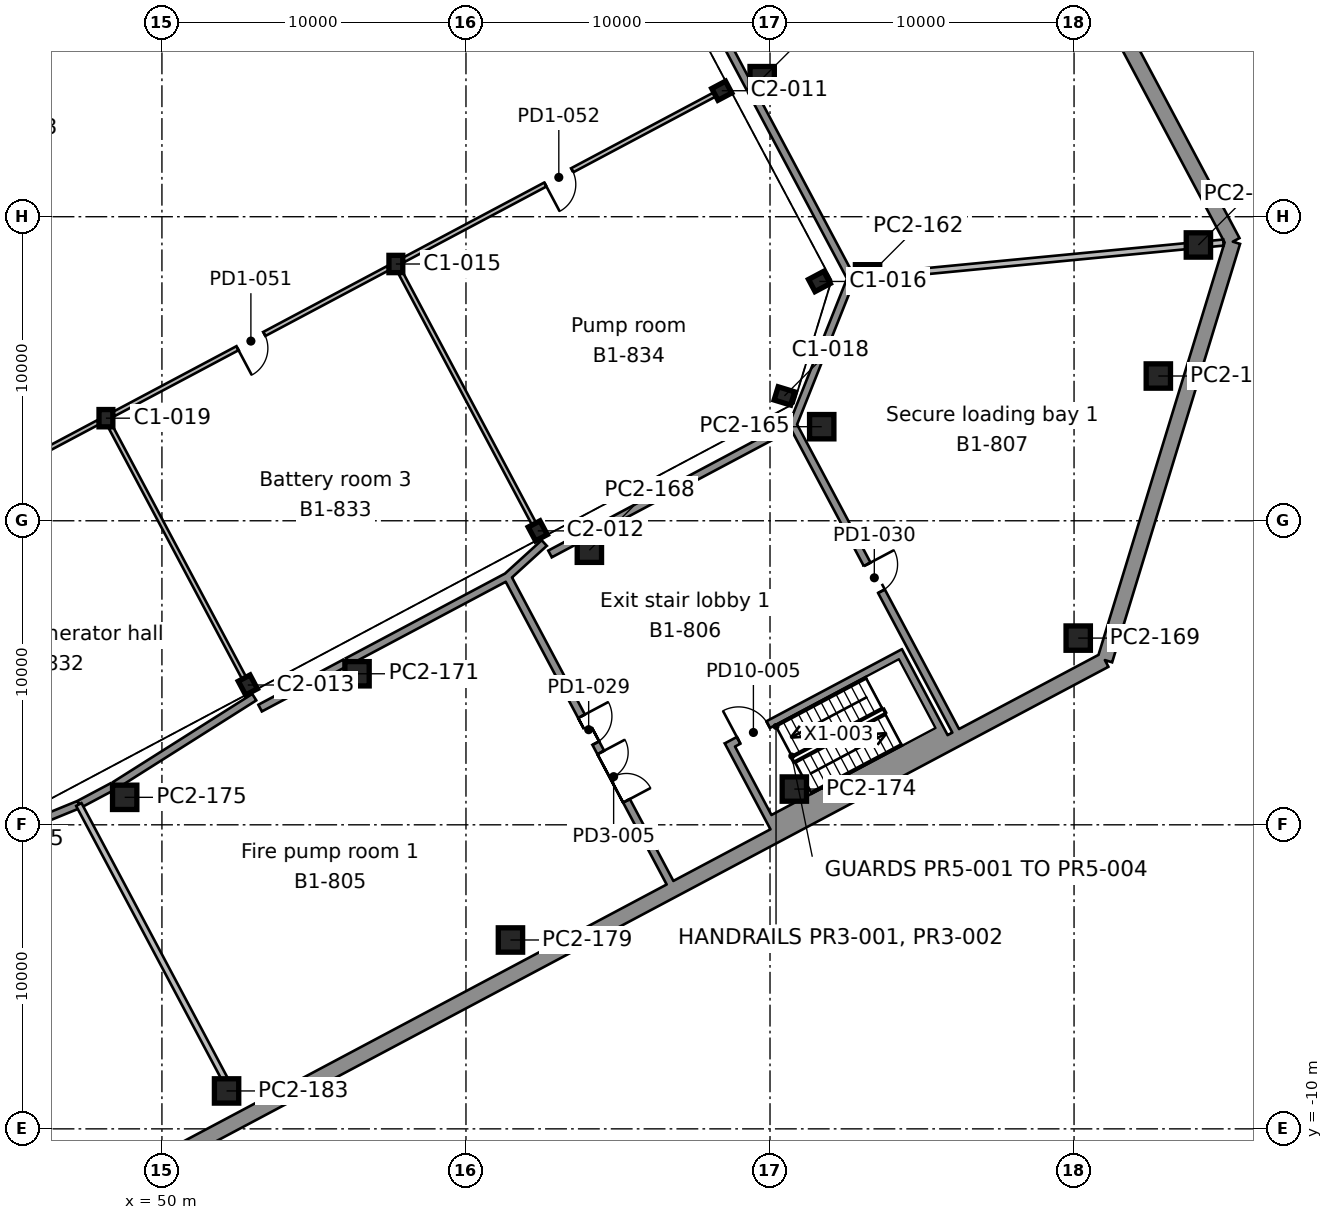
"""IFC4 building model, lengths in metres.
Left out: names, types, materials, properties, quantities, classifications, styles, units other than length and angle.
Written with IfcOpenShell. Run it as: python <this file> out.ifc"""

import sys

from ifc_helpers import new_model, si_unit, direction, frame, frame_2d, origin, origin_2d, place, context, subcontext, project, spatial, rectangle, i_section, extrude, element, fill, save


model = new_model("IFC4")
c1 = context("Model", 3, precision=1e-05, world=origin(), true_north=direction((0.0, 1.0)))
c2 = subcontext(c1, "Body", "Model", "MODEL_VIEW")
j1 = project(units=[si_unit("LENGTHUNIT", "METRE"), si_unit("PLANEANGLEUNIT", "RADIAN")], contexts=[c1])
p1 = place(None, origin())
s1 = spatial("IfcSite", under=j1, at=p1, CompositionType="ELEMENT")
p2 = place(p1, origin())
s2 = spatial("IfcBuilding", under=s1, at=p2, CompositionType="ELEMENT")
p3 = place(p2, frame((0.0, 0.0, -4.5)))
s3 = spatial("IfcBuildingStorey", under=s2, at=p3, CompositionType="ELEMENT", Elevation=-4.5)
for number, where, z_axis, x_axis in (
    (1, (52.825, 4.598, 0.0), (0.0, 0.0, 1.0), (0.883, 0.469, 0.0)),
    (2, (62.361, 9.668, 0.0), (0.0, 0.0, 1.0), (0.883, 0.469, 0.0)),
):
    element("IfcColumn", number, at=place(p3, frame(where, z_axis=z_axis, x_axis=x_axis)), inside=s3, PredefinedType="COLUMN", context=c2, shape_type="SweptSolid", body=[
        extrude(i_section(OverallWidth=0.437, OverallDepth=0.513, WebThickness=0.061, FlangeThickness=0.097, FilletRadius=0.015, at=origin_2d()), origin(), (0.0, 0.0, 1.0), 4.5),
    ])
for number, where, z_axis, x_axis in (
    (3, (48.158, 13.374, 0.0), (0.0, 0.0, 1.0), (1.0, 0.0, 0.0)),
    (4, (70.474, 14.106, 0.0), (0.0, 0.0, 1.0), (0.292, 0.956, 0.0)),
    (5, (71.625, 17.871, 0.0), (0.0, 0.0, 1.0), (-0.469, 0.883, 0.0)),
    (6, (57.694, 18.445, 0.0), (0.0, 0.0, 1.0), (1.0, 0.0, 0.0)),
):
    element("IfcColumn", number, at=place(p3, frame(where, z_axis=z_axis, x_axis=x_axis)), inside=s3, PredefinedType="COLUMN", context=c2, shape_type="SweptSolid", body=[
        extrude(i_section(OverallWidth=0.455, OverallDepth=0.569, WebThickness=0.078, FlangeThickness=0.125, FilletRadius=0.015, at=origin_2d()), origin(), (0.0, 0.0, 1.0), 4.5),
    ])
p4 = place(p3, frame((68.413, 24.144, 0.0), z_axis=(0.0, 0.0, 1.0), x_axis=(-0.469471562786, 0.882947592859, 0.0)))
e7 = element("IfcColumn", 7, at=p4, inside=s3, PredefinedType="COLUMN", context=c2, shape_type="SweptSolid", body=[
    extrude(i_section(OverallWidth=0.437, OverallDepth=0.513, WebThickness=0.061, FlangeThickness=0.097, FilletRadius=0.015, at=origin_2d()), origin(), (0.0, 0.0, 1.0), 4.5),
])
p5 = place(p3, frame((5.703, -34.625, 0.0), z_axis=(0.0, 0.0, 1.0), x_axis=(0.882947521781, 0.469471696464, 0.0)))
e8 = element("IfcWall", 8, at=p5, inside=s3, PredefinedType="SOLIDWALL", context=c2, shape_type="SweptSolid", body=[
    extrude(rectangle(XDim=85.294, YDim=0.5, at=frame_2d((42.647, 0.0))), origin(), (0.0, 0.0, 1.0), 4.5),
])
p6 = place(p3, frame((81.013, 5.418, 0.0), z_axis=(0.0, 0.0, 1.0), x_axis=(0.292375850554, 0.956303488445, 0.0)))
e9 = element("IfcWall", 9, at=p6, inside=s3, PredefinedType="SOLIDWALL", context=c2, shape_type="SweptSolid", body=[
    extrude(rectangle(XDim=14.391, YDim=0.5, at=frame_2d((7.195, 0.0))), origin(), (0.0, 0.0, 1.0), 4.5),
])
p7 = place(p3, frame((85.221, 19.18, 0.0), z_axis=(0.0, 0.0, 1.0), x_axis=(-0.469470569953, 0.882948120757, 0.0)))
e10 = element("IfcWall", 10, at=p7, inside=s3, PredefinedType="SOLIDWALL", context=c2, shape_type="SweptSolid", body=[
    extrude(rectangle(XDim=46.148, YDim=0.5, at=frame_2d((23.074, 0.0))), origin(), (0.0, 0.0, 1.0), 4.5),
])
for number, where, z_axis, x_axis in (
    (11, (52.126, -8.753, 0.0), (0.0, 0.0, 1.0), (1.0, 0.0, 0.0)),
    (12, (61.463, -3.788, 0.0), (0.0, 0.0, 1.0), (1.0, 0.0, 0.0)),
    (13, (48.775, 0.904, 0.0), (0.0, 0.0, 1.0), (1.0, 0.0, 0.0)),
    (14, (70.8, 1.176, 0.0), (0.0, 0.0, 1.0), (1.0, 0.0, 0.0)),
    (15, (56.417, 4.968, 0.0), (0.0, 0.0, 1.0), (1.0, 0.0, 0.0)),
    (16, (80.137, 6.141, 0.0), (0.0, 0.0, 1.0), (1.0, 0.0, 0.0)),
    (17, (64.059, 9.031, 0.0), (0.0, 0.0, 1.0), (1.0, 0.0, 0.0)),
    (18, (71.701, 13.094, 0.0), (0.0, 0.0, 1.0), (1.0, 0.0, 0.0)),
    (19, (82.772, 14.761, 0.0), (0.0, 0.0, 1.0), (1.0, 0.0, 0.0)),
    (20, (73.208, 18.023, 0.0), (0.0, 0.0, 1.0), (1.0, 0.0, 0.0)),
    (21, (84.09, 19.071, 0.0), (0.0, 0.0, 1.0), (1.0, 0.0, 0.0)),
    (22, (69.742, 24.541, 0.0), (0.0, 0.0, 1.0), (1.0, 0.0, 0.0)),
):
    element("IfcColumn", number, at=place(p3, frame(where, z_axis=z_axis, x_axis=x_axis)), inside=s3, PredefinedType="COLUMN", context=c2, shape_type="SweptSolid", body=[
        extrude(rectangle(XDim=0.8, YDim=0.8, at=origin_2d()), origin(), (0.0, 0.0, 1.0), 4.05),
    ])
p8 = place(p3, frame((52.063, -8.353, 0.0), z_axis=(0.0, 0.0, 1.0), x_axis=(-0.469467926311, 0.882949526397, 0.0)))
e23 = element("IfcWall", 23, at=p8, inside=s3, PredefinedType="PARTITIONING", context=c2, shape_type="SweptSolid", body=[
    extrude(rectangle(XDim=10.217, YDim=0.2, at=frame_2d((5.109, 0.0))), origin(), (0.0, 0.0, 1.0), 4.05),
])
p9 = place(p3, frame((47.27, 0.67, 0.0), z_axis=(0.0, 0.0, 1.0), x_axis=(-0.925490593681, -0.378770591531, 0.0)))
e24 = element("IfcWall", 24, at=p9, inside=s3, PredefinedType="SOLIDWALL", context=c2, shape_type="SweptSolid", body=[
    extrude(rectangle(XDim=4.072, YDim=0.25, at=frame_2d((2.036, 0.0))), origin(), (0.0, 0.0, 1.0), 4.05),
])
p10 = place(p3, frame((66.711, -1.904, 0.0), z_axis=(0.0, 0.0, 1.0), x_axis=(-0.469474097874, 0.882946244924, 0.0)))
e25 = element("IfcWall", 25, at=p10, inside=s3, PredefinedType="SOLIDWALL", context=c2, shape_type="SweptSolid", body=[
    extrude(rectangle(XDim=11.4, YDim=0.25, at=frame_2d((5.7, 0.0))), origin(), (0.0, 0.0, 1.0), 4.05),
])
p11 = place(p10, frame((5.2, 0.0, 0.0)))
e26 = element("IfcOpeningElement", 26, at=p11, cuts=e25, PredefinedType="OPENING", context=c2, shape_type="SweptSolid", body=[
    extrude(rectangle(XDim=1.0, YDim=2.1, at=frame_2d((0.5, 1.05))), frame((0.0, 0.135, 0.0), z_axis=(0.0, -1.0, 0.0), x_axis=(1.0, 0.0, 0.0)), (0.0, 0.0, 1.0), 0.27),
])
p12 = place(p10, frame((3.05, 0.0, 0.0)))
e27 = element("IfcOpeningElement", 27, at=p12, cuts=e25, PredefinedType="OPENING", context=c2, shape_type="SweptSolid", body=[
    extrude(rectangle(XDim=1.8, YDim=2.1, at=frame_2d((0.9, 1.05))), frame((0.0, 0.135, 0.0), z_axis=(0.0, -1.0, 0.0), x_axis=(1.0, 0.0, 0.0)), (0.0, 0.0, 1.0), 0.27),
])
p13 = place(p3, frame((53.037, 4.198, 0.0), z_axis=(0.0, 0.0, 1.0), x_axis=(-0.845143693755, -0.534539181825, 0.0)))
e28 = element("IfcWall", 28, at=p13, inside=s3, PredefinedType="SOLIDWALL", context=c2, shape_type="SweptSolid", body=[
    extrude(rectangle(XDim=5.414, YDim=0.25, at=frame_2d((2.707, 0.0))), origin(), (0.0, 0.0, 1.0), 4.05),
])
p14 = place(p3, frame((48.375, 1.258, 0.0), z_axis=(0.0, 0.0, 1.0), x_axis=(-0.883006084416, -0.469361539631, 0.0)))
e29 = element("IfcWall", 29, at=p14, inside=s3, PredefinedType="SOLIDWALL", context=c2, shape_type="SweptSolid", body=[
    extrude(rectangle(XDim=1.24, YDim=0.25, at=frame_2d((0.62, 0.0))), origin(), (0.0, 0.0, 1.0), 4.05),
])
p15 = place(p3, frame((61.363, 8.164, 0.0), z_axis=(0.0, 0.0, 1.0), x_axis=(-0.882945796858, -0.469474940556, 0.0)))
e30 = element("IfcWall", 30, at=p15, inside=s3, PredefinedType="SOLIDWALL", context=c2, shape_type="SweptSolid", body=[
    extrude(rectangle(XDim=5.955, YDim=0.25, at=frame_2d((2.978, 0.0))), origin(), (0.0, 0.0, 1.0), 4.05),
])
p16 = place(p3, frame((56.017, 5.321, 0.0), z_axis=(0.0, 0.0, 1.0), x_axis=(-0.882921481106, -0.469520668555, 0.0)))
e31 = element("IfcWall", 31, at=p16, inside=s3, PredefinedType="SOLIDWALL", context=c2, shape_type="SweptSolid", body=[
    extrude(rectangle(XDim=3.158, YDim=0.25, at=frame_2d((1.579, 0.0))), origin(), (0.0, 0.0, 1.0), 4.05),
])
p17 = place(p3, frame((76.107, 3.092, 0.0), z_axis=(0.0, 0.0, 1.0), x_axis=(-0.469474097874, 0.882946244924, 0.0)))
e32 = element("IfcWall", 32, at=p17, inside=s3, PredefinedType="SOLIDWALL", context=c2, shape_type="SweptSolid", body=[
    extrude(rectangle(XDim=11.4, YDim=0.25, at=frame_2d((5.7, 0.0))), origin(), (0.0, 0.0, 1.0), 4.05),
])
p18 = place(p17, frame((5.2, 0.0, 0.0)))
e33 = element("IfcOpeningElement", 33, at=p18, cuts=e32, PredefinedType="OPENING", context=c2, shape_type="SweptSolid", body=[
    extrude(rectangle(XDim=1.0, YDim=2.1, at=frame_2d((0.5, 1.05))), frame((0.0, 0.135, 0.0), z_axis=(0.0, -1.0, 0.0), x_axis=(1.0, 0.0, 0.0)), (0.0, 0.0, 1.0), 0.27),
])
p19 = place(p3, frame((62.573, 9.268, 0.0), z_axis=(0.0, 0.0, 1.0), x_axis=(-0.739544046234, -0.673108166404, 0.0)))
e34 = element("IfcWall", 34, at=p19, inside=s3, PredefinedType="SOLIDWALL", context=c2, shape_type="SweptSolid", body=[
    extrude(rectangle(XDim=1.646, YDim=0.25, at=frame_2d((0.823, 0.0))), origin(), (0.0, 0.0, 1.0), 4.05),
])
p20 = place(p3, frame((70.758, 13.159, 0.0), z_axis=(0.0, 0.0, 1.0), x_axis=(-0.882950480299, -0.46946613226, 0.0)))
e35 = element("IfcWall", 35, at=p20, inside=s3, PredefinedType="SOLIDWALL", context=c2, shape_type="SweptSolid", body=[
    extrude(rectangle(XDim=7.941, YDim=0.25, at=frame_2d((3.971, 0.0))), origin(), (0.0, 0.0, 1.0), 4.05),
])
p21 = place(p3, frame((63.659, 9.385, 0.0), z_axis=(0.0, 0.0, 1.0), x_axis=(-0.882866012348, -0.469624961263, 0.0)))
e36 = element("IfcWall", 36, at=p21, inside=s3, PredefinedType="SOLIDWALL", context=c2, shape_type="SweptSolid", body=[
    extrude(rectangle(XDim=1.013, YDim=0.25, at=frame_2d((0.507, 0.0))), origin(), (0.0, 0.0, 1.0), 4.05),
])
p22 = place(p3, frame((84.912, 19.15, 0.0), z_axis=(0.0, 0.0, 1.0), x_axis=(-0.995412196651, -0.095679458393, 0.0)))
e37 = element("IfcWall", 37, at=p22, inside=s3, PredefinedType="PARTITIONING", context=c2, shape_type="SweptSolid", body=[
    extrude(rectangle(XDim=0.424, YDim=0.2, at=frame_2d((0.212, 0.0))), origin(), (0.0, 0.0, 1.0), 4.05),
])
p23 = place(p3, frame((83.69, 19.032, 0.0), z_axis=(0.0, 0.0, 1.0), x_axis=(-0.995397009029, -0.095837333105, 0.0)))
e38 = element("IfcWall", 38, at=p23, inside=s3, PredefinedType="PARTITIONING", context=c2, shape_type="SweptSolid", body=[
    extrude(rectangle(XDim=10.129, YDim=0.2, at=frame_2d((5.064, 0.0))), origin(), (0.0, 0.0, 1.0), 4.05),
])
p24 = place(p3, frame((72.669, 17.971, 0.0), z_axis=(0.0, 0.0, 1.0), x_axis=(-0.370009777786, -0.929027859831, 0.0)))
e39 = element("IfcWall", 39, at=p24, inside=s3, PredefinedType="SOLIDWALL", context=c2, shape_type="SweptSolid", body=[
    extrude(rectangle(XDim=5.184, YDim=0.25, at=frame_2d((2.592, 0.0))), origin(), (0.0, 0.0, 1.0), 4.05),
])
p25 = place(p3, frame((65.923, 30.659, 0.0), z_axis=(0.0, 0.0, 1.0), x_axis=(0.469479540895, -0.882943350777, 0.0)))
e40 = element("IfcWall", 40, at=p25, inside=s3, PredefinedType="SOLIDWALL", context=c2, shape_type="SweptSolid", body=[
    extrude(rectangle(XDim=7.283, YDim=0.25, at=frame_2d((3.642, 0.0))), origin(), (0.0, 0.0, 1.0), 4.05),
])
p26 = place(p25, frame((3.141, 0.0, 0.0)))
e41 = element("IfcOpeningElement", 41, at=p26, cuts=e40, PredefinedType="OPENING", context=c2, shape_type="SweptSolid", body=[
    extrude(rectangle(XDim=1.0, YDim=2.1, at=frame_2d((0.5, 1.05))), frame((0.0, 0.135, 0.0), z_axis=(0.0, -1.0, 0.0), x_axis=(1.0, 0.0, 0.0)), (0.0, 0.0, 1.0), 0.27),
])
p27 = place(p3, frame((69.389, 24.141, 0.0), z_axis=(0.0, 0.0, 1.0), x_axis=(0.469461736628, -0.882952817449, 0.0)))
e42 = element("IfcWall", 42, at=p27, inside=s3, PredefinedType="SOLIDWALL", context=c2, shape_type="SweptSolid", body=[
    extrude(rectangle(XDim=6.988, YDim=0.25, at=frame_2d((3.494, 0.0))), origin(), (0.0, 0.0, 1.0), 4.05),
])
p28 = place(p3, frame((38.622, 8.304, 0.0), z_axis=(0.0, 0.0, 1.0), x_axis=(0.882956451437, 0.469454901845, 0.0)))
e43 = element("IfcWall", 43, at=p28, inside=s3, PredefinedType="PARTITIONING", context=c2, shape_type="SweptSolid", body=[
    extrude(rectangle(XDim=10.502, YDim=0.15, at=frame_2d((5.251, 0.0))), origin(), (0.0, 0.0, 1.0), 4.05),
])
p29 = place(p28, frame((4.673, 0.0, 0.0)))
e44 = element("IfcOpeningElement", 44, at=p29, cuts=e43, PredefinedType="OPENING", context=c2, shape_type="SweptSolid", body=[
    extrude(rectangle(XDim=1.0, YDim=2.1, at=frame_2d((0.5, 1.05))), frame((0.0, 0.085, 0.0), z_axis=(0.0, -1.0, 0.0), x_axis=(1.0, 0.0, 0.0)), (0.0, 0.0, 1.0), 0.17),
])
p30 = place(p3, frame((48.421, 13.514, 0.0), z_axis=(0.0, 0.0, 1.0), x_axis=(0.882940965658, 0.469484026526, 0.0)))
e45 = element("IfcWall", 45, at=p30, inside=s3, PredefinedType="PARTITIONING", context=c2, shape_type="SweptSolid", body=[
    extrude(rectangle(XDim=10.205, YDim=0.15, at=frame_2d((5.103, 0.0))), origin(), (0.0, 0.0, 1.0), 4.05),
])
p31 = place(p30, frame((4.603, 0.0, 0.0)))
e46 = element("IfcOpeningElement", 46, at=p31, cuts=e45, PredefinedType="OPENING", context=c2, shape_type="SweptSolid", body=[
    extrude(rectangle(XDim=1.0, YDim=2.1, at=frame_2d((0.5, 1.05))), frame((0.0, 0.085, 0.0), z_axis=(0.0, -1.0, 0.0), x_axis=(1.0, 0.0, 0.0)), (0.0, 0.0, 1.0), 0.17),
])
p32 = place(p3, frame((57.957, 18.584, 0.0), z_axis=(0.0, 0.0, 1.0), x_axis=(0.882944872937, 0.469476678179, 0.0)))
e47 = element("IfcWall", 47, at=p32, inside=s3, PredefinedType="PARTITIONING", context=c2, shape_type="SweptSolid", body=[
    extrude(rectangle(XDim=11.586, YDim=0.15, at=frame_2d((5.793, 0.0))), origin(), (0.0, 0.0, 1.0), 4.05),
])
p33 = place(p32, frame((5.273, 0.0, 0.0)))
e48 = element("IfcOpeningElement", 48, at=p33, cuts=e47, PredefinedType="OPENING", context=c2, shape_type="SweptSolid", body=[
    extrude(rectangle(XDim=1.0, YDim=2.1, at=frame_2d((0.5, 1.05))), frame((0.0, 0.085, 0.0), z_axis=(0.0, -1.0, 0.0), x_axis=(1.0, 0.0, 0.0)), (0.0, 0.0, 1.0), 0.17),
])
p34 = place(p3, frame((52.704, 4.824, 0.0), z_axis=(0.0, 0.0, 1.0), x_axis=(-0.469494001944, 0.882935661381, 0.0)))
e49 = element("IfcWall", 49, at=p34, inside=s3, PredefinedType="PARTITIONING", context=c2, shape_type="SweptSolid", body=[
    extrude(rectangle(XDim=9.325, YDim=0.15, at=frame_2d((4.663, 0.0))), origin(), (0.0, 0.0, 1.0), 4.05),
])
p35 = place(p3, frame((62.24, 9.894, 0.0), z_axis=(0.0, 0.0, 1.0), x_axis=(-0.469471003187, 0.882947890403, 0.0)))
e50 = element("IfcWall", 50, at=p35, inside=s3, PredefinedType="PARTITIONING", context=c2, shape_type="SweptSolid", body=[
    extrude(rectangle(XDim=9.326, YDim=0.15, at=frame_2d((4.663, 0.0))), origin(), (0.0, 0.0, 1.0), 4.05),
])
p36 = place(p3, frame((69.937, 0.264, 0.0), z_axis=(0.0, 0.0, 1.0), x_axis=(-0.469533439143, 0.882914689835, 0.0)))
e51 = element("IfcWall", 51, at=p36, inside=s3, PredefinedType="SOLIDWALL", context=c2, shape_type="SweptSolid", body=[
    extrude(rectangle(XDim=2.8, YDim=0.25, at=frame_2d((1.4, 0.0))), origin(), (0.0, 0.0, 1.0), 4.05),
])
p37 = place(p3, frame((75.544, 3.245, 0.0), z_axis=(0.0, 0.0, 1.0), x_axis=(-0.469497295046, 0.882933910293, 0.0)))
e52 = element("IfcWall", 52, at=p37, inside=s3, PredefinedType="SOLIDWALL", context=c2, shape_type="SweptSolid", body=[
    extrude(rectangle(XDim=2.8, YDim=0.25, at=frame_2d((1.4, 0.0))), origin(), (0.0, 0.0, 1.0), 4.05),
])
p38 = place(p3, frame((68.571, 2.567, 0.0), z_axis=(0.0, 0.0, 1.0), x_axis=(0.882937969766, 0.469489660743, 0.0)))
e53 = element("IfcWall", 53, at=p38, inside=s3, PredefinedType="SOLIDWALL", context=c2, shape_type="SweptSolid", body=[
    extrude(rectangle(XDim=6.6, YDim=0.25, at=frame_2d((3.3, 0.0))), origin(), (0.0, 0.0, 1.0), 4.05),
])
p39 = place(p38, frame((0.45, 0.0, 0.0)))
e54 = element("IfcOpeningElement", 54, at=p39, cuts=e53, PredefinedType="OPENING", context=c2, shape_type="SweptSolid", body=[
    extrude(rectangle(XDim=1.1, YDim=2.1, at=frame_2d((0.55, 1.05))), frame((0.0, 0.135, 0.0), z_axis=(0.0, -1.0, 0.0), x_axis=(1.0, 0.0, 0.0)), (0.0, 0.0, 1.0), 0.27),
])
p40 = place(p3, frame((69.92, 0.029, 0.0), z_axis=(0.0, 0.0, 1.0), x_axis=(0.882953303447, 0.469460822575, 0.0)))
e55 = element("IfcWall", 55, at=p40, inside=s3, PredefinedType="SOLIDWALL", context=c2, shape_type="SweptSolid", body=[
    extrude(rectangle(XDim=6.6, YDim=0.4, at=frame_2d((3.3, 0.0))), origin(), (0.0, 0.0, 1.0), 4.05),
])
p41 = place(p39, origin())
e56 = element("IfcDoor", 56, at=p41, inside=s3, OperationType="SINGLE_SWING_LEFT", PredefinedType="DOOR", context=c2, shape_type="SweptSolid", body=[
    extrude(rectangle(XDim=1.1, YDim=2.1, at=frame_2d((0.55, 1.05))), frame((0.0, 0.025, 0.0), z_axis=(0.0, -1.0, 0.0), x_axis=(1.0, 0.0, 0.0)), (0.0, 0.0, 1.0), 0.05),
])
fill(e54, e56)
p42 = place(p33, frame((1.0, 0.0, 0.0), z_axis=(0.0, 0.0, 1.0), x_axis=(-1.0, 0.0, 0.0)))
e57 = element("IfcDoor", 57, at=p42, inside=s3, OperationType="SINGLE_SWING_RIGHT", PredefinedType="DOOR", context=c2, shape_type="SweptSolid", body=[
    extrude(rectangle(XDim=1.0, YDim=2.1, at=frame_2d((0.5, 1.05))), frame((0.0, 0.025, 0.0), z_axis=(0.0, -1.0, 0.0), x_axis=(1.0, 0.0, 0.0)), (0.0, 0.0, 1.0), 0.05),
])
fill(e48, e57)
p43 = place(p31, frame((1.0, 0.0, 0.0), z_axis=(0.0, 0.0, 1.0), x_axis=(-1.0, 0.0, 0.0)))
e58 = element("IfcDoor", 58, at=p43, inside=s3, OperationType="SINGLE_SWING_RIGHT", PredefinedType="DOOR", context=c2, shape_type="SweptSolid", body=[
    extrude(rectangle(XDim=1.0, YDim=2.1, at=frame_2d((0.5, 1.05))), frame((0.0, 0.025, 0.0), z_axis=(0.0, -1.0, 0.0), x_axis=(1.0, 0.0, 0.0)), (0.0, 0.0, 1.0), 0.05),
])
fill(e46, e58)
p44 = place(p11, frame((1.0, 0.0, 0.0), z_axis=(0.0, 0.0, 1.0), x_axis=(-1.0, 0.0, 0.0)))
e59 = element("IfcDoor", 59, at=p44, inside=s3, OperationType="SINGLE_SWING_LEFT", PredefinedType="DOOR", context=c2, shape_type="SweptSolid", body=[
    extrude(rectangle(XDim=1.0, YDim=2.1, at=frame_2d((0.5, 1.05))), frame((0.0, 0.025, 0.0), z_axis=(0.0, -1.0, 0.0), x_axis=(1.0, 0.0, 0.0)), (0.0, 0.0, 1.0), 0.05),
])
fill(e26, e59)
p45 = place(p18, frame((1.0, 0.0, 0.0), z_axis=(0.0, 0.0, 1.0), x_axis=(-1.0, 0.0, 0.0)))
e60 = element("IfcDoor", 60, at=p45, inside=s3, OperationType="SINGLE_SWING_LEFT", PredefinedType="DOOR", context=c2, shape_type="SweptSolid", body=[
    extrude(rectangle(XDim=1.0, YDim=2.1, at=frame_2d((0.5, 1.05))), frame((0.0, 0.025, 0.0), z_axis=(0.0, -1.0, 0.0), x_axis=(1.0, 0.0, 0.0)), (0.0, 0.0, 1.0), 0.05),
])
fill(e33, e60)
p46 = place(p12, frame((1.8, 0.0, 0.0), z_axis=(0.0, 0.0, 1.0), x_axis=(-1.0, 0.0, 0.0)))
e61 = element("IfcDoor", 61, at=p46, inside=s3, OperationType="DOUBLE_DOOR_SINGLE_SWING", PredefinedType="DOOR", context=c2, shape_type="SweptSolid", body=[
    extrude(rectangle(XDim=1.8, YDim=2.1, at=frame_2d((0.9, 1.05))), frame((0.0, 0.025, 0.0), z_axis=(0.0, -1.0, 0.0), x_axis=(1.0, 0.0, 0.0)), (0.0, 0.0, 1.0), 0.05),
])
fill(e27, e61)
save(model, sys.argv[1])
